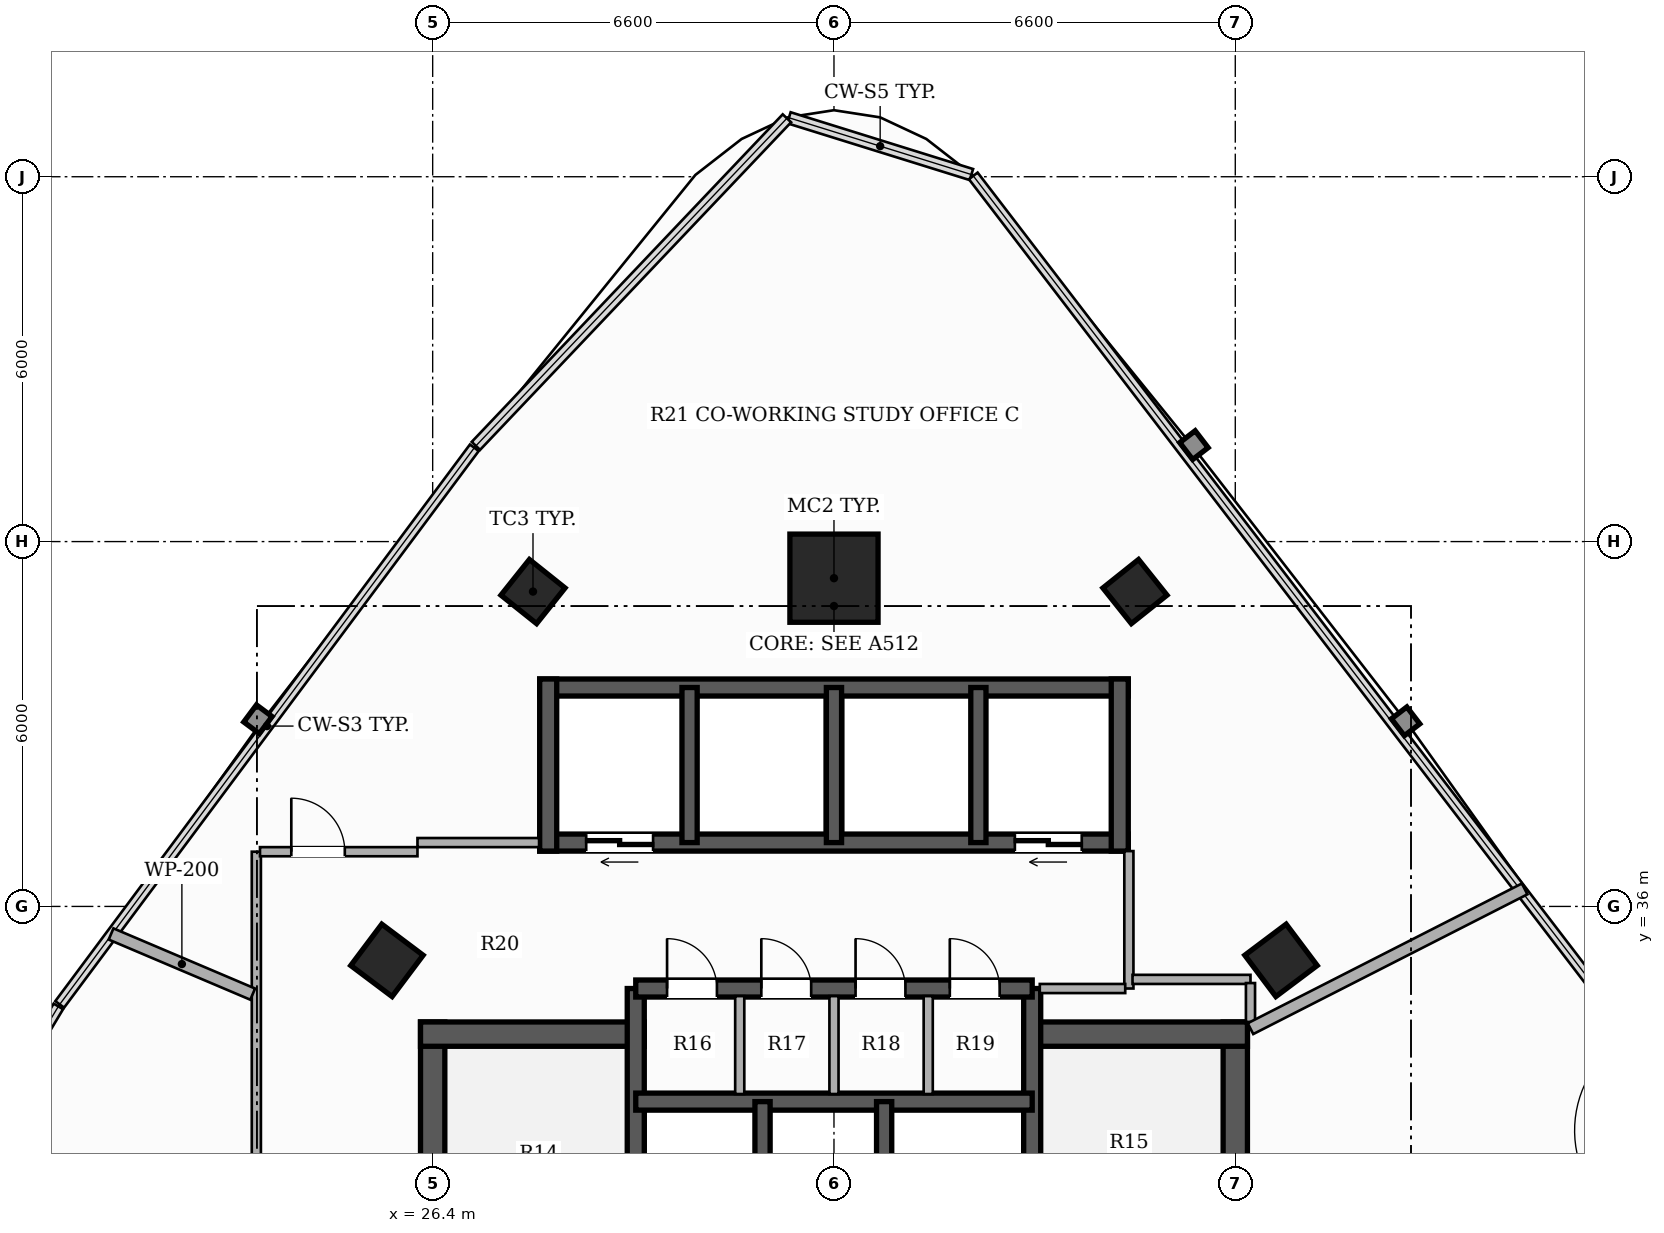
"""IFC4 building model, lengths in metres.
Left out: names, types, materials, properties, quantities, classifications, styles, units other than length and angle.
Written with IfcOpenShell. Run it as: python <this file> out.ifc"""

import sys

from ifc_helpers import new_model, si_unit, direction, frame, frame_2d, origin, origin_2d, place, context, subcontext, project, spatial, rectangle, hollow_rectangle, extrude, element, fill, save


model = new_model("IFC4")
c1 = context("Model", 3, precision=1e-05, world=origin(), true_north=direction((0.0, 1.0)))
c2 = subcontext(c1, "Body", "Model", "MODEL_VIEW")
j1 = project(units=[si_unit("LENGTHUNIT", "METRE"), si_unit("PLANEANGLEUNIT", "RADIAN")], contexts=[c1])
p1 = place(None, origin())
s1 = spatial("IfcSite", under=j1, at=p1, CompositionType="ELEMENT")
p2 = place(p1, origin())
s2 = spatial("IfcBuilding", under=s1, at=p2, CompositionType="ELEMENT")
p3 = place(p2, frame((0.0, 0.0, 129.8)))
s3 = spatial("IfcBuildingStorey", under=s2, at=p3, CompositionType="ELEMENT", Elevation=129.8)
p4 = place(p3, frame((26.4, 26.5, 0.0), z_axis=(0.0, 0.0, 1.0), x_axis=(0.0, 1.0, 0.0)))
e1 = element("IfcWall", 1, at=p4, inside=s3, PredefinedType="SHEAR", context=c2, shape_type="SweptSolid", body=[
    extrude(rectangle(XDim=7.6, YDim=0.4, at=frame_2d((3.8, 0.0))), origin(), (0.0, 0.0, 1.0), 3.3),
])
p5 = place(p3, frame((26.2, 33.9, 0.0), z_axis=(0.0, 0.0, 1.0), x_axis=(1.0, 0.0, 0.0)))
e2 = element("IfcWall", 2, at=p5, inside=s3, PredefinedType="SHEAR", context=c2, shape_type="SweptSolid", body=[
    extrude(rectangle(XDim=3.68, YDim=0.4, at=frame_2d((1.84, 0.0))), origin(), (0.0, 0.0, 1.0), 3.3),
])
p6 = place(p3, frame((39.6, 26.5, 0.0), z_axis=(0.0, 0.0, 1.0), x_axis=(0.0, 1.0, 0.0)))
e3 = element("IfcWall", 3, at=p6, inside=s3, PredefinedType="SHEAR", context=c2, shape_type="SweptSolid", body=[
    extrude(rectangle(XDim=7.6, YDim=0.4, at=frame_2d((3.8, 0.0))), origin(), (0.0, 0.0, 1.0), 3.3),
])
p7 = place(p3, frame((36.12, 33.9, 0.0), z_axis=(0.0, 0.0, 1.0), x_axis=(1.0, 0.0, 0.0)))
e4 = element("IfcWall", 4, at=p7, inside=s3, PredefinedType="SHEAR", context=c2, shape_type="SweptSolid", body=[
    extrude(rectangle(XDim=3.68, YDim=0.4, at=frame_2d((1.84, 0.0))), origin(), (0.0, 0.0, 1.0), 3.3),
])
p8 = place(p3, frame((29.74, 26.5, 0.0), z_axis=(0.0, 0.0, 1.0), x_axis=(0.0, 1.0, 0.0)))
e5 = element("IfcWall", 5, at=p8, inside=s3, PredefinedType="SHEAR", context=c2, shape_type="SweptSolid", body=[
    extrude(rectangle(XDim=8.15, YDim=0.28, at=frame_2d((4.075, 0.0))), origin(), (0.0, 0.0, 1.0), 3.3),
])
p9 = place(p8, frame((0.6, 0.0, 0.0)))
e6 = element("IfcOpeningElement", 6, at=p9, cuts=e5, PredefinedType="OPENING", context=c2, shape_type="SweptSolid", body=[
    extrude(rectangle(XDim=1.05, YDim=2.15, at=frame_2d((0.525, 1.075))), frame((0.0, 0.15, 0.0), z_axis=(0.0, -1.0, 0.0), x_axis=(1.0, 0.0, 0.0)), (0.0, 0.0, 1.0), 0.3),
])
p10 = place(p3, frame((36.26, 26.5, 0.0), z_axis=(0.0, 0.0, 1.0), x_axis=(0.0, 1.0, 0.0)))
e7 = element("IfcWall", 7, at=p10, inside=s3, PredefinedType="SHEAR", context=c2, shape_type="SweptSolid", body=[
    extrude(rectangle(XDim=8.15, YDim=0.28, at=frame_2d((4.075, 0.0))), origin(), (0.0, 0.0, 1.0), 3.3),
])
p11 = place(p10, frame((0.6, 0.0, 0.0)))
e8 = element("IfcOpeningElement", 8, at=p11, cuts=e7, PredefinedType="OPENING", context=c2, shape_type="SweptSolid", body=[
    extrude(rectangle(XDim=1.05, YDim=2.15, at=frame_2d((0.525, 1.075))), frame((0.0, 0.15, 0.0), z_axis=(0.0, -1.0, 0.0), x_axis=(1.0, 0.0, 0.0)), (0.0, 0.0, 1.0), 0.3),
])
p12 = place(p3, frame((29.74, 32.79, 0.0), z_axis=(0.0, 0.0, 1.0), x_axis=(1.0, 0.0, 0.0)))
e9 = element("IfcWall", 9, at=p12, inside=s3, PredefinedType="SHEAR", context=c2, shape_type="SweptSolid", body=[
    extrude(rectangle(XDim=6.52, YDim=0.28, at=frame_2d((3.26, 0.0))), origin(), (0.0, 0.0, 1.0), 3.3),
])
for number, where, z_axis, x_axis in (
    (10, (31.825, 29.89, 0.0), (0.0, 0.0, 1.0), (0.0, 1.0, 0.0)),
    (11, (33.825, 29.89, 0.0), (0.0, 0.0, 1.0), (0.0, 1.0, 0.0)),
):
    element("IfcWall", number, at=place(p3, frame(where, z_axis=z_axis, x_axis=x_axis)), inside=s3, PredefinedType="SHEAR", context=c2, shape_type="SweptSolid", body=[
        extrude(rectangle(XDim=2.9, YDim=0.25, at=frame_2d((1.45, 0.0))), origin(), (0.0, 0.0, 1.0), 3.3),
    ])
p13 = place(p3, frame((29.74, 34.65, 0.0), z_axis=(0.0, 0.0, 1.0), x_axis=(1.0, 0.0, 0.0)))
e12 = element("IfcWall", 12, at=p13, inside=s3, PredefinedType="SHEAR", context=c2, shape_type="SweptSolid", body=[
    extrude(rectangle(XDim=6.52, YDim=0.28, at=frame_2d((3.26, 0.0))), origin(), (0.0, 0.0, 1.0), 3.3),
])
p14 = place(p13, frame((0.515, 0.0, 0.0)))
e13 = element("IfcOpeningElement", 13, at=p14, cuts=e12, PredefinedType="OPENING", context=c2, shape_type="SweptSolid", body=[
    extrude(rectangle(XDim=0.82, YDim=2.1, at=frame_2d((0.41, 1.05))), frame((0.0, 0.15, 0.0), z_axis=(0.0, -1.0, 0.0), x_axis=(1.0, 0.0, 0.0)), (0.0, 0.0, 1.0), 0.3),
])
p15 = place(p13, frame((2.065, 0.0, 0.0)))
e14 = element("IfcOpeningElement", 14, at=p15, cuts=e12, PredefinedType="OPENING", context=c2, shape_type="SweptSolid", body=[
    extrude(rectangle(XDim=0.82, YDim=2.1, at=frame_2d((0.41, 1.05))), frame((0.0, 0.15, 0.0), z_axis=(0.0, -1.0, 0.0), x_axis=(1.0, 0.0, 0.0)), (0.0, 0.0, 1.0), 0.3),
])
p16 = place(p13, frame((3.615, 0.0, 0.0)))
e15 = element("IfcOpeningElement", 15, at=p16, cuts=e12, PredefinedType="OPENING", context=c2, shape_type="SweptSolid", body=[
    extrude(rectangle(XDim=0.82, YDim=2.1, at=frame_2d((0.41, 1.05))), frame((0.0, 0.15, 0.0), z_axis=(0.0, -1.0, 0.0), x_axis=(1.0, 0.0, 0.0)), (0.0, 0.0, 1.0), 0.3),
])
p17 = place(p13, frame((5.165, 0.0, 0.0)))
e16 = element("IfcOpeningElement", 16, at=p17, cuts=e12, PredefinedType="OPENING", context=c2, shape_type="SweptSolid", body=[
    extrude(rectangle(XDim=0.82, YDim=2.1, at=frame_2d((0.41, 1.05))), frame((0.0, 0.15, 0.0), z_axis=(0.0, -1.0, 0.0), x_axis=(1.0, 0.0, 0.0)), (0.0, 0.0, 1.0), 0.3),
])
p18 = place(p3, frame((37.84, 37.05, 0.0), z_axis=(0.0, 0.0, 1.0), x_axis=(-1.0, 0.0, 0.0)))
e17 = element("IfcWall", 17, at=p18, inside=s3, PredefinedType="SHEAR", context=c2, shape_type="SweptSolid", body=[
    extrude(rectangle(XDim=9.68, YDim=0.28, at=frame_2d((4.84, 0.0))), origin(), (0.0, 0.0, 1.0), 3.3),
])
p19 = place(p18, frame((7.815, 0.0, 0.0)))
e18 = element("IfcOpeningElement", 18, at=p19, cuts=e17, PredefinedType="OPENING", context=c2, shape_type="SweptSolid", body=[
    extrude(rectangle(XDim=1.1, YDim=2.2, at=frame_2d((0.55, 1.1))), frame((0.0, 0.15, 0.0), z_axis=(0.0, -1.0, 0.0), x_axis=(1.0, 0.0, 0.0)), (0.0, 0.0, 1.0), 0.3),
])
p20 = place(p18, frame((0.765, 0.0, 0.0)))
e19 = element("IfcOpeningElement", 19, at=p20, cuts=e17, PredefinedType="OPENING", context=c2, shape_type="SweptSolid", body=[
    extrude(rectangle(XDim=1.1, YDim=2.2, at=frame_2d((0.55, 1.1))), frame((0.0, 0.15, 0.0), z_axis=(0.0, -1.0, 0.0), x_axis=(1.0, 0.0, 0.0)), (0.0, 0.0, 1.0), 0.3),
])
p21 = place(p3, frame((28.16, 39.6, 0.0), z_axis=(0.0, 0.0, 1.0), x_axis=(1.0, 0.0, 0.0)))
e20 = element("IfcWall", 20, at=p21, inside=s3, PredefinedType="SHEAR", context=c2, shape_type="SweptSolid", body=[
    extrude(rectangle(XDim=9.68, YDim=0.28, at=frame_2d((4.84, 0.0))), origin(), (0.0, 0.0, 1.0), 3.3),
])
for number, where, z_axis, x_axis in (
    (21, (28.3, 36.91, 0.0), (0.0, 0.0, 1.0), (0.0, 1.0, 0.0)),
    (22, (37.7, 36.91, 0.0), (0.0, 0.0, 1.0), (0.0, 1.0, 0.0)),
):
    element("IfcWall", number, at=place(p3, frame(where, z_axis=z_axis, x_axis=x_axis)), inside=s3, PredefinedType="SHEAR", context=c2, shape_type="SweptSolid", body=[
        extrude(rectangle(XDim=2.83, YDim=0.28, at=frame_2d((1.415, 0.0))), origin(), (0.0, 0.0, 1.0), 3.3),
    ])
for number, where, z_axis, x_axis in (
    (23, (30.625, 37.05, 0.0), (0.0, 0.0, 1.0), (0.0, 1.0, 0.0)),
    (24, (33.0, 37.05, 0.0), (0.0, 0.0, 1.0), (0.0, 1.0, 0.0)),
    (25, (35.375, 37.05, 0.0), (0.0, 0.0, 1.0), (0.0, 1.0, 0.0)),
):
    element("IfcWall", number, at=place(p3, frame(where, z_axis=z_axis, x_axis=x_axis)), inside=s3, PredefinedType="SHEAR", context=c2, shape_type="SweptSolid", body=[
        extrude(rectangle(XDim=2.55, YDim=0.25, at=frame_2d((1.275, 0.0))), origin(), (0.0, 0.0, 1.0), 3.3),
    ])
p22 = place(p3, frame((33.0, 41.398, 0.0), z_axis=(0.0, 0.0, 1.0), x_axis=(1.0, 0.0, 0.0)))
e26 = element("IfcColumn", 26, at=p22, inside=s3, PredefinedType="COLUMN", context=c2, shape_type="SweptSolid", body=[
    extrude(hollow_rectangle(XDim=1.45, YDim=1.45, WallThickness=0.045, at=origin_2d()), origin(), (0.0, 0.0, 1.0), 3.3),
])
for number, where, z_axis, x_axis in (
    (27, (25.648, 35.113, 0.0), (0.0, 0.0, 1.0), (0.6, 0.8, 0.0)),
    (28, (40.352, 35.113, 0.0), (0.0, 0.0, 1.0), (-0.6, 0.8, 0.0)),
):
    element("IfcColumn", number, at=place(p3, frame(where, z_axis=z_axis, x_axis=x_axis)), inside=s3, PredefinedType="COLUMN", context=c2, shape_type="SweptSolid", body=[
        extrude(hollow_rectangle(XDim=0.85, YDim=0.85, WallThickness=0.028, at=origin_2d()), origin(), (0.0, 0.0, 1.0), 3.3),
    ])
for number, where, z_axis, x_axis in (
    (29, (28.05, 41.178, 0.0), (0.0, 0.0, 1.0), (0.624, 0.782, 0.0)),
    (30, (37.95, 41.178, 0.0), (0.0, 0.0, 1.0), (-0.624, 0.782, 0.0)),
):
    element("IfcColumn", number, at=place(p3, frame(where, z_axis=z_axis, x_axis=x_axis)), inside=s3, PredefinedType="COLUMN", context=c2, shape_type="SweptSolid", body=[
        extrude(hollow_rectangle(XDim=0.75, YDim=0.75, WallThickness=0.025, at=origin_2d()), origin(), (0.0, 0.0, 1.0), 3.3),
    ])
p23 = place(p3, frame((37.85, 34.65, 0.0), z_axis=(0.0, 0.0, 1.0), x_axis=(0.0, 1.0, 0.0)))
e31 = element("IfcWall", 31, at=p23, inside=s3, PredefinedType="PARTITIONING", context=c2, shape_type="SweptSolid", body=[
    extrude(rectangle(XDim=2.26, YDim=0.15, at=frame_2d((1.13, 0.0))), origin(), (0.0, 0.0, 1.0), 3.06),
])
p24 = place(p3, frame((36.385, 34.65, 0.0), z_axis=(0.0, 0.0, 1.0), x_axis=(1.0, 0.0, 0.0)))
e32 = element("IfcWall", 32, at=p24, inside=s3, PredefinedType="PARTITIONING", context=c2, shape_type="SweptSolid", body=[
    extrude(rectangle(XDim=1.405, YDim=0.15, at=frame_2d((0.703, 0.0))), origin(), (0.0, 0.0, 1.0), 2.425),
])
for number, where, z_axis, x_axis in (
    (33, (31.45, 32.915, 0.0), (0.0, 0.0, 1.0), (0.0, 1.0, 0.0)),
    (34, (33.0, 32.915, 0.0), (0.0, 0.0, 1.0), (0.0, 1.0, 0.0)),
    (35, (34.55, 32.915, 0.0), (0.0, 0.0, 1.0), (0.0, 1.0, 0.0)),
):
    element("IfcWall", number, at=place(p3, frame(where, z_axis=z_axis, x_axis=x_axis)), inside=s3, PredefinedType="PARTITIONING", context=c2, shape_type="SweptSolid", body=[
        extrude(rectangle(XDim=1.61, YDim=0.15, at=frame_2d((0.805, 0.0))), origin(), (0.0, 0.0, 1.0), 3.06),
    ])
p25 = place(p3, frame((23.5, 14.06, 0.0), z_axis=(0.0, 0.0, 1.0), x_axis=(0.0, 1.0, 0.0)))
e36 = element("IfcWall", 36, at=p25, inside=s3, PredefinedType="PARTITIONING", context=c2, shape_type="SweptSolid", body=[
    extrude(rectangle(XDim=22.84, YDim=0.15, at=frame_2d((11.42, 0.0))), origin(), (0.0, 0.0, 1.0), 2.413),
])
p26 = place(p25, frame((13.045, 0.0, 0.0)))
e37 = element("IfcOpeningElement", 37, at=p26, cuts=e36, PredefinedType="OPENING", context=c2, shape_type="SweptSolid", body=[
    extrude(rectangle(XDim=0.88, YDim=2.1, at=frame_2d((0.44, 1.05))), frame((0.0, 0.085, 0.0), z_axis=(0.0, -1.0, 0.0), x_axis=(1.0, 0.0, 0.0)), (0.0, 0.0, 1.0), 0.17),
])
p27 = place(p25, frame((2.977, 0.0, 0.0)))
e38 = element("IfcOpeningElement", 38, at=p27, cuts=e36, PredefinedType="OPENING", context=c2, shape_type="SweptSolid", body=[
    extrude(rectangle(XDim=0.92, YDim=2.15, at=frame_2d((0.46, 1.075))), frame((0.0, 0.085, 0.0), z_axis=(0.0, -1.0, 0.0), x_axis=(1.0, 0.0, 0.0)), (0.0, 0.0, 1.0), 0.17),
])
p28 = place(p3, frame((23.56, 36.9, 0.0), z_axis=(0.0, 0.0, 1.0), x_axis=(1.0, 0.0, 0.0)))
e39 = element("IfcWall", 39, at=p28, inside=s3, PredefinedType="PARTITIONING", context=c2, shape_type="SweptSolid", body=[
    extrude(rectangle(XDim=2.59, YDim=0.15, at=frame_2d((1.295, 0.0))), origin(), (0.0, 0.0, 1.0), 2.413),
])
p29 = place(p28, frame((0.515, 0.0, 0.0)))
e40 = element("IfcOpeningElement", 40, at=p29, cuts=e39, PredefinedType="OPENING", context=c2, shape_type="SweptSolid", body=[
    extrude(rectangle(XDim=0.88, YDim=2.1, at=frame_2d((0.44, 1.05))), frame((0.0, 0.085, 0.0), z_axis=(0.0, -1.0, 0.0), x_axis=(1.0, 0.0, 0.0)), (0.0, 0.0, 1.0), 0.17),
])
p30 = place(p3, frame((26.15, 37.05, 0.0), z_axis=(0.0, 0.0, 1.0), x_axis=(1.0, 0.0, 0.0)))
e41 = element("IfcWall", 41, at=p30, inside=s3, PredefinedType="PARTITIONING", context=c2, shape_type="SweptSolid", body=[
    extrude(rectangle(XDim=2.0, YDim=0.15, at=frame_2d((1.0, 0.0))), origin(), (0.0, 0.0, 1.0), 2.413),
])
p31 = place(p3, frame((37.91, 34.8, 0.0), z_axis=(0.0, 0.0, 1.0), x_axis=(1.0, 0.0, 0.0)))
e42 = element("IfcWall", 42, at=p31, inside=s3, PredefinedType="PARTITIONING", context=c2, shape_type="SweptSolid", body=[
    extrude(rectangle(XDim=1.94, YDim=0.15, at=frame_2d((0.97, 0.0))), origin(), (0.0, 0.0, 1.0), 2.721),
])
p32 = place(p3, frame((39.85, 34.74, 0.0), z_axis=(0.0, 0.0, 1.0), x_axis=(0.0, -1.0, 0.0)))
e43 = element("IfcWall", 43, at=p32, inside=s3, PredefinedType="PARTITIONING", context=c2, shape_type="SweptSolid", body=[
    extrude(rectangle(XDim=0.64, YDim=0.15, at=frame_2d((0.32, 0.0))), origin(), (0.0, 0.0, 1.0), 2.721),
])
p33 = place(p3, frame((21.111, 35.547, 0.0), z_axis=(0.0, 0.0, 1.0), x_axis=(0.920437694564, -0.390889307126, 0.0)))
e44 = element("IfcWall", 44, at=p33, inside=s3, PredefinedType="PARTITIONING", context=c2, shape_type="SweptSolid", body=[
    extrude(rectangle(XDim=2.53, YDim=0.2, at=frame_2d((1.265, 0.0))), origin(), (0.0, 0.0, 1.0), 3.06),
])
p34 = place(p3, frame((44.359, 36.288, 0.0), z_axis=(0.0, 0.0, 1.0), x_axis=(-0.890946333403, -0.454108611453, 0.0)))
e45 = element("IfcWall", 45, at=p34, inside=s3, PredefinedType="PARTITIONING", context=c2, shape_type="SweptSolid", body=[
    extrude(rectangle(XDim=5.061, YDim=0.2, at=frame_2d((2.53, 0.0))), origin(), (0.0, 0.0, 1.0), 2.413),
])
p35 = place(p19, origin())
e46 = element("IfcDoor", 46, at=p35, inside=s3, OperationType="DOUBLE_DOOR_SLIDING", PredefinedType="DOOR", context=c2, shape_type="SweptSolid", body=[
    extrude(rectangle(XDim=1.1, YDim=2.2, at=frame_2d((0.55, 1.1))), frame((0.0, 0.025, 0.0), z_axis=(0.0, -1.0, 0.0), x_axis=(1.0, 0.0, 0.0)), (0.0, 0.0, 1.0), 0.05),
])
fill(e18, e46)
p36 = place(p20, origin())
e47 = element("IfcDoor", 47, at=p36, inside=s3, OperationType="DOUBLE_DOOR_SLIDING", PredefinedType="DOOR", context=c2, shape_type="SweptSolid", body=[
    extrude(rectangle(XDim=1.1, YDim=2.2, at=frame_2d((0.55, 1.1))), frame((0.0, 0.025, 0.0), z_axis=(0.0, -1.0, 0.0), x_axis=(1.0, 0.0, 0.0)), (0.0, 0.0, 1.0), 0.05),
])
fill(e19, e47)
p37 = place(p14, origin())
e48 = element("IfcDoor", 48, at=p37, inside=s3, OperationType="SINGLE_SWING_LEFT", PredefinedType="DOOR", context=c2, shape_type="SweptSolid", body=[
    extrude(rectangle(XDim=0.82, YDim=2.1, at=frame_2d((0.41, 1.05))), frame((0.0, 0.025, 0.0), z_axis=(0.0, -1.0, 0.0), x_axis=(1.0, 0.0, 0.0)), (0.0, 0.0, 1.0), 0.05),
])
fill(e13, e48)
p38 = place(p15, origin())
e49 = element("IfcDoor", 49, at=p38, inside=s3, OperationType="SINGLE_SWING_LEFT", PredefinedType="DOOR", context=c2, shape_type="SweptSolid", body=[
    extrude(rectangle(XDim=0.82, YDim=2.1, at=frame_2d((0.41, 1.05))), frame((0.0, 0.025, 0.0), z_axis=(0.0, -1.0, 0.0), x_axis=(1.0, 0.0, 0.0)), (0.0, 0.0, 1.0), 0.05),
])
fill(e14, e49)
p39 = place(p16, origin())
e50 = element("IfcDoor", 50, at=p39, inside=s3, OperationType="SINGLE_SWING_LEFT", PredefinedType="DOOR", context=c2, shape_type="SweptSolid", body=[
    extrude(rectangle(XDim=0.82, YDim=2.1, at=frame_2d((0.41, 1.05))), frame((0.0, 0.025, 0.0), z_axis=(0.0, -1.0, 0.0), x_axis=(1.0, 0.0, 0.0)), (0.0, 0.0, 1.0), 0.05),
])
fill(e15, e50)
p40 = place(p17, origin())
e51 = element("IfcDoor", 51, at=p40, inside=s3, OperationType="SINGLE_SWING_LEFT", PredefinedType="DOOR", context=c2, shape_type="SweptSolid", body=[
    extrude(rectangle(XDim=0.82, YDim=2.1, at=frame_2d((0.41, 1.05))), frame((0.0, 0.025, 0.0), z_axis=(0.0, -1.0, 0.0), x_axis=(1.0, 0.0, 0.0)), (0.0, 0.0, 1.0), 0.05),
])
fill(e16, e51)
p41 = place(p29, origin())
e52 = element("IfcDoor", 52, at=p41, inside=s3, OperationType="SINGLE_SWING_LEFT", PredefinedType="DOOR", context=c2, shape_type="SweptSolid", body=[
    extrude(rectangle(XDim=0.88, YDim=2.1, at=frame_2d((0.44, 1.05))), frame((0.0, 0.025, 0.0), z_axis=(0.0, -1.0, 0.0), x_axis=(1.0, 0.0, 0.0)), (0.0, 0.0, 1.0), 0.05),
])
fill(e40, e52)
save(model, sys.argv[1])
